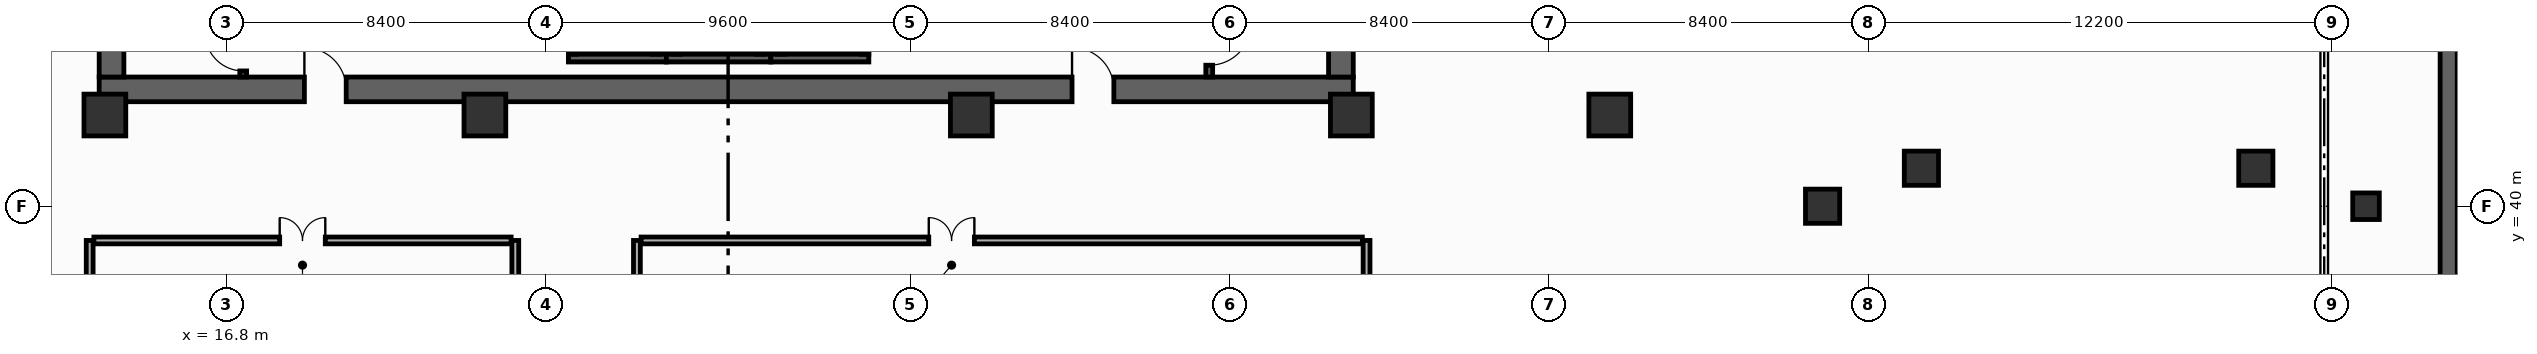
"""IFC4 building model, lengths in metres.
Left out: names, types, materials, properties, quantities, classifications, styles, units other than length and angle.
Written with IfcOpenShell. Run it as: python <this file> out.ifc"""

import sys

from ifc_helpers import new_model, si_unit, direction, frame, frame_2d, origin, origin_2d, place, context, subcontext, project, spatial, rectangle, extrude, element, fill, save


model = new_model("IFC4")
c1 = context("Model", 3, precision=1e-05, world=origin(), true_north=direction((0.0, 1.0)))
c2 = subcontext(c1, "Body", "Model", "MODEL_VIEW")
j1 = project(units=[si_unit("LENGTHUNIT", "METRE"), si_unit("PLANEANGLEUNIT", "RADIAN")], contexts=[c1])
p1 = place(None, origin())
s1 = spatial("IfcSite", under=j1, at=p1, CompositionType="ELEMENT")
p2 = place(p1, origin())
s2 = spatial("IfcBuilding", under=s1, at=p2, CompositionType="ELEMENT")
p3 = place(p2, frame((0.0, 0.0, -10.8)))
s3 = spatial("IfcBuildingStorey", under=s2, at=p3, CompositionType="ELEMENT", Elevation=-10.8)
p4 = place(p3, frame((13.45, 43.075, 0.0), z_axis=(0.0, 0.0, 1.0), x_axis=(1.0, 0.0, 0.0)))
e1 = element("IfcWall", 1, at=p4, inside=s3, PredefinedType="SHEAR", context=c2, shape_type="SweptSolid", body=[
    extrude(rectangle(XDim=33.0, YDim=0.65, at=frame_2d((16.5, 0.0))), origin(), (0.0, 0.0, 1.0), 5.05),
])
p5 = place(p4, frame((5.4, 0.0, 0.0)))
e2 = element("IfcOpeningElement", 2, at=p5, cuts=e1, PredefinedType="OPENING", context=c2, shape_type="SweptSolid", body=[
    extrude(rectangle(XDim=1.1, YDim=2.15, at=frame_2d((0.55, 1.075))), frame((0.0, 0.335, 0.0), z_axis=(0.0, -1.0, 0.0), x_axis=(1.0, 0.0, 0.0)), (0.0, 0.0, 1.0), 0.67),
])
p6 = place(p4, frame((25.6, 0.0, 0.0)))
e3 = element("IfcOpeningElement", 3, at=p6, cuts=e1, PredefinedType="OPENING", context=c2, shape_type="SweptSolid", body=[
    extrude(rectangle(XDim=1.1, YDim=2.15, at=frame_2d((0.55, 1.075))), frame((0.0, 0.335, 0.0), z_axis=(0.0, -1.0, 0.0), x_axis=(1.0, 0.0, 0.0)), (0.0, 0.0, 1.0), 0.67),
])
for number, where, z_axis, x_axis in (
    (4, (13.775, 43.4, 0.0), (0.0, 0.0, 1.0), (0.0, 1.0, 0.0)),
    (5, (46.125, 43.4, 0.0), (0.0, 0.0, 1.0), (0.0, 1.0, 0.0)),
):
    element("IfcWall", number, at=place(p3, frame(where, z_axis=z_axis, x_axis=x_axis)), inside=s3, PredefinedType="SHEAR", context=c2, shape_type="SweptSolid", body=[
        extrude(rectangle(XDim=10.4, YDim=0.65, at=frame_2d((5.2, 0.0))), origin(), (0.0, 0.0, 1.0), 5.05),
    ])
p7 = place(p3, frame((75.275, 36.6, 0.0), z_axis=(0.0, 0.0, 1.0), x_axis=(0.0, 1.0, 0.0)))
e6 = element("IfcWall", 6, at=p7, inside=s3, PredefinedType="SHEAR", context=c2, shape_type="SweptSolid", body=[
    extrude(rectangle(XDim=8.8, YDim=0.45, at=frame_2d((4.4, 0.0))), origin(), (0.0, 0.0, 1.0), 5.05),
])
for number, where, z_axis, x_axis in (
    (7, (13.6, 42.4, 0.0), (0.0, 0.0, 1.0), (1.0, 0.0, 0.0)),
    (8, (23.6, 42.4, 0.0), (0.0, 0.0, 1.0), (1.0, 0.0, 0.0)),
    (9, (36.4, 42.4, 0.0), (0.0, 0.0, 1.0), (1.0, 0.0, 0.0)),
    (10, (46.4, 42.4, 0.0), (0.0, 0.0, 1.0), (1.0, 0.0, 0.0)),
    (11, (53.2, 42.4, 0.0), (0.0, 0.0, 1.0), (1.0, 0.0, 0.0)),
):
    element("IfcColumn", number, at=place(p3, frame(where, z_axis=z_axis, x_axis=x_axis)), inside=s3, PredefinedType="COLUMN", context=c2, shape_type="SweptSolid", body=[
        extrude(rectangle(XDim=1.1, YDim=1.1, at=origin_2d()), origin(), (0.0, 0.0, 1.0), 5.4),
    ])
for number, where, z_axis, x_axis in (
    (12, (58.8, 40.0, 0.0), (0.0, 0.0, 1.0), (1.0, 0.0, 0.0)),
    (13, (61.4, 41.0, 0.0), (0.0, 0.0, 1.0), (1.0, 0.0, 0.0)),
    (14, (70.2, 41.0, 0.0), (0.0, 0.0, 1.0), (1.0, 0.0, 0.0)),
):
    element("IfcColumn", number, at=place(p3, frame(where, z_axis=z_axis, x_axis=x_axis)), inside=s3, PredefinedType="COLUMN", context=c2, shape_type="SweptSolid", body=[
        extrude(rectangle(XDim=0.9, YDim=0.9, at=origin_2d()), origin(), (0.0, 0.0, 1.0), 5.4),
    ])
p8 = place(p3, frame((73.1, 40.0, 0.0), z_axis=(0.0, 0.0, 1.0), x_axis=(1.0, 0.0, 0.0)))
e15 = element("IfcColumn", 15, at=p8, inside=s3, PredefinedType="COLUMN", context=c2, shape_type="SweptSolid", body=[
    extrude(rectangle(XDim=0.7, YDim=0.7, at=origin_2d()), origin(), (0.0, 0.0, 1.0), 5.4),
])
p9 = place(p3, frame((25.8, 43.9, -1.48), z_axis=(0.0, 0.0, 1.0), x_axis=(1.0, 0.0, 0.0)))
e16 = element("IfcWall", 16, at=p9, inside=s3, PredefinedType="SHEAR", context=c2, shape_type="SweptSolid", body=[
    extrude(rectangle(XDim=2.575, YDim=0.2, at=frame_2d((1.288, 0.0))), origin(), (0.0, 0.0, 1.0), 1.48),
])
for number, where, z_axis, x_axis in (
    (17, (25.9, 44.0, -1.48), (0.0, 0.0, 1.0), (0.0, 1.0, 0.0)),
    (18, (28.1, 44.0, -1.48), (0.0, 0.0, 1.0), (0.0, 1.0, 0.0)),
):
    element("IfcWall", number, at=place(p3, frame(where, z_axis=z_axis, x_axis=x_axis)), inside=s3, PredefinedType="SHEAR", context=c2, shape_type="SweptSolid", body=[
        extrude(rectangle(XDim=2.3, YDim=0.2, at=frame_2d((1.15, 0.0))), origin(), (0.0, 0.0, 1.0), 1.48),
    ])
p10 = place(p3, frame((25.8, 43.9, 0.0), z_axis=(0.0, 0.0, 1.0), x_axis=(1.0, 0.0, 0.0)))
e19 = element("IfcWall", 19, at=p10, inside=s3, PredefinedType="SHEAR", context=c2, shape_type="SweptSolid", body=[
    extrude(rectangle(XDim=2.575, YDim=0.2, at=frame_2d((1.288, 0.0))), origin(), (0.0, 0.0, 1.0), 5.05),
])
for number, where, z_axis, x_axis in (
    (20, (25.9, 44.0, 0.0), (0.0, 0.0, 1.0), (0.0, 1.0, 0.0)),
    (21, (28.1, 44.0, 0.0), (0.0, 0.0, 1.0), (0.0, 1.0, 0.0)),
):
    element("IfcWall", number, at=place(p3, frame(where, z_axis=z_axis, x_axis=x_axis)), inside=s3, PredefinedType="SHEAR", context=c2, shape_type="SweptSolid", body=[
        extrude(rectangle(XDim=2.3, YDim=0.2, at=frame_2d((1.15, 0.0))), origin(), (0.0, 0.0, 1.0), 5.05),
    ])
p11 = place(p3, frame((28.375, 43.9, -1.48), z_axis=(0.0, 0.0, 1.0), x_axis=(1.0, 0.0, 0.0)))
e22 = element("IfcWall", 22, at=p11, inside=s3, PredefinedType="SHEAR", context=c2, shape_type="SweptSolid", body=[
    extrude(rectangle(XDim=2.75, YDim=0.2, at=frame_2d((1.375, 0.0))), origin(), (0.0, 0.0, 1.0), 1.48),
])
for number, where, z_axis, x_axis in (
    (23, (28.65, 44.0, -1.48), (0.0, 0.0, 1.0), (0.0, 1.0, 0.0)),
    (24, (30.85, 44.0, -1.48), (0.0, 0.0, 1.0), (0.0, 1.0, 0.0)),
):
    element("IfcWall", number, at=place(p3, frame(where, z_axis=z_axis, x_axis=x_axis)), inside=s3, PredefinedType="SHEAR", context=c2, shape_type="SweptSolid", body=[
        extrude(rectangle(XDim=2.3, YDim=0.2, at=frame_2d((1.15, 0.0))), origin(), (0.0, 0.0, 1.0), 1.48),
    ])
p12 = place(p3, frame((28.375, 43.9, 0.0), z_axis=(0.0, 0.0, 1.0), x_axis=(1.0, 0.0, 0.0)))
e25 = element("IfcWall", 25, at=p12, inside=s3, PredefinedType="SHEAR", context=c2, shape_type="SweptSolid", body=[
    extrude(rectangle(XDim=2.75, YDim=0.2, at=frame_2d((1.375, 0.0))), origin(), (0.0, 0.0, 1.0), 5.05),
])
for number, where, z_axis, x_axis in (
    (26, (28.65, 44.0, 0.0), (0.0, 0.0, 1.0), (0.0, 1.0, 0.0)),
    (27, (30.85, 44.0, 0.0), (0.0, 0.0, 1.0), (0.0, 1.0, 0.0)),
):
    element("IfcWall", number, at=place(p3, frame(where, z_axis=z_axis, x_axis=x_axis)), inside=s3, PredefinedType="SHEAR", context=c2, shape_type="SweptSolid", body=[
        extrude(rectangle(XDim=2.3, YDim=0.2, at=frame_2d((1.15, 0.0))), origin(), (0.0, 0.0, 1.0), 5.05),
    ])
p13 = place(p3, frame((31.125, 43.9, -1.48), z_axis=(0.0, 0.0, 1.0), x_axis=(1.0, 0.0, 0.0)))
e28 = element("IfcWall", 28, at=p13, inside=s3, PredefinedType="SHEAR", context=c2, shape_type="SweptSolid", body=[
    extrude(rectangle(XDim=2.575, YDim=0.2, at=frame_2d((1.288, 0.0))), origin(), (0.0, 0.0, 1.0), 1.48),
])
for number, where, z_axis, x_axis in (
    (29, (31.4, 44.0, -1.48), (0.0, 0.0, 1.0), (0.0, 1.0, 0.0)),
    (30, (33.6, 44.0, -1.48), (0.0, 0.0, 1.0), (0.0, 1.0, 0.0)),
):
    element("IfcWall", number, at=place(p3, frame(where, z_axis=z_axis, x_axis=x_axis)), inside=s3, PredefinedType="SHEAR", context=c2, shape_type="SweptSolid", body=[
        extrude(rectangle(XDim=2.3, YDim=0.2, at=frame_2d((1.15, 0.0))), origin(), (0.0, 0.0, 1.0), 1.48),
    ])
p14 = place(p3, frame((31.125, 43.9, 0.0), z_axis=(0.0, 0.0, 1.0), x_axis=(1.0, 0.0, 0.0)))
e31 = element("IfcWall", 31, at=p14, inside=s3, PredefinedType="SHEAR", context=c2, shape_type="SweptSolid", body=[
    extrude(rectangle(XDim=2.575, YDim=0.2, at=frame_2d((1.288, 0.0))), origin(), (0.0, 0.0, 1.0), 5.05),
])
for number, where, z_axis, x_axis in (
    (32, (31.4, 44.0, 0.0), (0.0, 0.0, 1.0), (0.0, 1.0, 0.0)),
    (33, (33.6, 44.0, 0.0), (0.0, 0.0, 1.0), (0.0, 1.0, 0.0)),
):
    element("IfcWall", number, at=place(p3, frame(where, z_axis=z_axis, x_axis=x_axis)), inside=s3, PredefinedType="SHEAR", context=c2, shape_type="SweptSolid", body=[
        extrude(rectangle(XDim=2.3, YDim=0.2, at=frame_2d((1.15, 0.0))), origin(), (0.0, 0.0, 1.0), 5.05),
    ])
p15 = place(p3, frame((17.24, 43.4, 0.0), z_axis=(0.0, 0.0, 1.0), x_axis=(0.0, 1.0, 0.0)))
e34 = element("IfcWall", 34, at=p15, inside=s3, PredefinedType="SHEAR", context=c2, shape_type="SweptSolid", body=[
    extrude(rectangle(XDim=10.4, YDim=0.18, at=frame_2d((5.2, 0.0))), origin(), (0.0, 0.0, 1.0), 5.05),
])
p16 = place(p15, frame((0.16, 0.0, 0.0)))
e35 = element("IfcOpeningElement", 35, at=p16, cuts=e34, PredefinedType="OPENING", context=c2, shape_type="SweptSolid", body=[
    extrude(rectangle(XDim=1.0, YDim=2.15, at=frame_2d((0.5, 1.075))), frame((0.0, 0.1, 0.0), z_axis=(0.0, -1.0, 0.0), x_axis=(1.0, 0.0, 0.0)), (0.0, 0.0, 1.0), 0.2),
])
p17 = place(p3, frame((42.66, 53.8, 0.0), z_axis=(0.0, 0.0, 1.0), x_axis=(0.0, -1.0, 0.0)))
e36 = element("IfcWall", 36, at=p17, inside=s3, PredefinedType="SHEAR", context=c2, shape_type="SweptSolid", body=[
    extrude(rectangle(XDim=10.4, YDim=0.18, at=frame_2d((5.2, 0.0))), origin(), (0.0, 0.0, 1.0), 5.05),
])
p18 = place(p17, frame((8.99, 0.0, 0.0)))
e37 = element("IfcOpeningElement", 37, at=p18, cuts=e36, PredefinedType="OPENING", context=c2, shape_type="SweptSolid", body=[
    extrude(rectangle(XDim=1.1, YDim=2.15, at=frame_2d((0.55, 1.075))), frame((0.0, 0.1, 0.0), z_axis=(0.0, -1.0, 0.0), x_axis=(1.0, 0.0, 0.0)), (0.0, 0.0, 1.0), 0.2),
])
p19 = place(p3, frame((13.2, 15.06, 0.0), z_axis=(0.0, 0.0, 1.0), x_axis=(0.0, 1.0, 0.0)))
e38 = element("IfcWall", 38, at=p19, inside=s3, PredefinedType="PARTITIONING", context=c2, shape_type="SweptSolid", body=[
    extrude(rectangle(XDim=24.04, YDim=0.18, at=frame_2d((12.02, 0.0))), origin(), (0.0, 0.0, 1.0), 4.135),
])
p20 = place(p3, frame((24.4, 26.46, 0.0), z_axis=(0.0, 0.0, 1.0), x_axis=(0.0, 1.0, 0.0)))
e39 = element("IfcWall", 39, at=p20, inside=s3, PredefinedType="PARTITIONING", context=c2, shape_type="SweptSolid", body=[
    extrude(rectangle(XDim=12.64, YDim=0.18, at=frame_2d((6.32, 0.0))), origin(), (0.0, 0.0, 1.0), 4.135),
])
p21 = place(p3, frame((13.31, 39.1, 0.0), z_axis=(0.0, 0.0, 1.0), x_axis=(1.0, 0.0, 0.0)))
e40 = element("IfcWall", 40, at=p21, inside=s3, PredefinedType="PARTITIONING", context=c2, shape_type="SweptSolid", body=[
    extrude(rectangle(XDim=10.98, YDim=0.18, at=frame_2d((5.49, 0.0))), origin(), (0.0, 0.0, 1.0), 4.135),
])
p22 = place(p21, frame((4.89, 0.0, 0.0)))
e41 = element("IfcOpeningElement", 41, at=p22, cuts=e40, PredefinedType="OPENING", context=c2, shape_type="SweptSolid", body=[
    extrude(rectangle(XDim=1.2, YDim=2.15, at=frame_2d((0.6, 1.075))), frame((0.0, 0.1, 0.0), z_axis=(0.0, -1.0, 0.0), x_axis=(1.0, 0.0, 0.0)), (0.0, 0.0, 1.0), 0.2),
])
p23 = place(p3, frame((46.8, 13.61, 0.0), z_axis=(0.0, 0.0, 1.0), x_axis=(0.0, 1.0, 0.0)))
e42 = element("IfcWall", 42, at=p23, inside=s3, PredefinedType="PARTITIONING", context=c2, shape_type="SweptSolid", body=[
    extrude(rectangle(XDim=25.49, YDim=0.18, at=frame_2d((12.745, 0.0))), origin(), (0.0, 0.0, 1.0), 4.135),
])
p24 = place(p3, frame((27.6, 26.46, 0.0), z_axis=(0.0, 0.0, 1.0), x_axis=(0.0, 1.0, 0.0)))
e43 = element("IfcWall", 43, at=p24, inside=s3, PredefinedType="PARTITIONING", context=c2, shape_type="SweptSolid", body=[
    extrude(rectangle(XDim=12.64, YDim=0.18, at=frame_2d((6.32, 0.0))), origin(), (0.0, 0.0, 1.0), 4.135),
])
p25 = place(p3, frame((27.71, 39.1, 0.0), z_axis=(0.0, 0.0, 1.0), x_axis=(1.0, 0.0, 0.0)))
e44 = element("IfcWall", 44, at=p25, inside=s3, PredefinedType="PARTITIONING", context=c2, shape_type="SweptSolid", body=[
    extrude(rectangle(XDim=18.98, YDim=0.18, at=frame_2d((9.49, 0.0))), origin(), (0.0, 0.0, 1.0), 4.135),
])
p26 = place(p25, frame((7.57, 0.0, 0.0)))
e45 = element("IfcOpeningElement", 45, at=p26, cuts=e44, PredefinedType="OPENING", context=c2, shape_type="SweptSolid", body=[
    extrude(rectangle(XDim=1.2, YDim=2.15, at=frame_2d((0.6, 1.075))), frame((0.0, 0.1, 0.0), z_axis=(0.0, -1.0, 0.0), x_axis=(1.0, 0.0, 0.0)), (0.0, 0.0, 1.0), 0.2),
])
p27 = place(p16, origin())
e46 = element("IfcDoor", 46, at=p27, inside=s3, OperationType="SINGLE_SWING_RIGHT", PredefinedType="DOOR", context=c2, shape_type="SweptSolid", body=[
    extrude(rectangle(XDim=1.0, YDim=2.15, at=frame_2d((0.5, 1.075))), frame((0.0, 0.025, 0.0), z_axis=(0.0, -1.0, 0.0), x_axis=(1.0, 0.0, 0.0)), (0.0, 0.0, 1.0), 0.05),
])
fill(e35, e46)
p28 = place(p18, origin())
e47 = element("IfcDoor", 47, at=p28, inside=s3, OperationType="SINGLE_SWING_LEFT", PredefinedType="DOOR", context=c2, shape_type="SweptSolid", body=[
    extrude(rectangle(XDim=1.1, YDim=2.15, at=frame_2d((0.55, 1.075))), frame((0.0, 0.025, 0.0), z_axis=(0.0, -1.0, 0.0), x_axis=(1.0, 0.0, 0.0)), (0.0, 0.0, 1.0), 0.05),
])
fill(e37, e47)
p29 = place(p5, origin())
e48 = element("IfcDoor", 48, at=p29, inside=s3, OperationType="SINGLE_SWING_LEFT", PredefinedType="DOOR", context=c2, shape_type="SweptSolid", body=[
    extrude(rectangle(XDim=1.1, YDim=2.15, at=frame_2d((0.55, 1.075))), frame((0.0, 0.025, 0.0), z_axis=(0.0, -1.0, 0.0), x_axis=(1.0, 0.0, 0.0)), (0.0, 0.0, 1.0), 0.05),
])
fill(e2, e48)
p30 = place(p6, origin())
e49 = element("IfcDoor", 49, at=p30, inside=s3, OperationType="SINGLE_SWING_LEFT", PredefinedType="DOOR", context=c2, shape_type="SweptSolid", body=[
    extrude(rectangle(XDim=1.1, YDim=2.15, at=frame_2d((0.55, 1.075))), frame((0.0, 0.025, 0.0), z_axis=(0.0, -1.0, 0.0), x_axis=(1.0, 0.0, 0.0)), (0.0, 0.0, 1.0), 0.05),
])
fill(e3, e49)
p31 = place(p22, origin())
e50 = element("IfcDoor", 50, at=p31, inside=s3, OperationType="DOUBLE_DOOR_SINGLE_SWING", PredefinedType="DOOR", context=c2, shape_type="SweptSolid", body=[
    extrude(rectangle(XDim=1.2, YDim=2.15, at=frame_2d((0.6, 1.075))), frame((0.0, 0.025, 0.0), z_axis=(0.0, -1.0, 0.0), x_axis=(1.0, 0.0, 0.0)), (0.0, 0.0, 1.0), 0.05),
])
fill(e41, e50)
p32 = place(p26, origin())
e51 = element("IfcDoor", 51, at=p32, inside=s3, OperationType="DOUBLE_DOOR_SINGLE_SWING", PredefinedType="DOOR", context=c2, shape_type="SweptSolid", body=[
    extrude(rectangle(XDim=1.2, YDim=2.15, at=frame_2d((0.6, 1.075))), frame((0.0, 0.025, 0.0), z_axis=(0.0, -1.0, 0.0), x_axis=(1.0, 0.0, 0.0)), (0.0, 0.0, 1.0), 0.05),
])
fill(e45, e51)
save(model, sys.argv[1])
